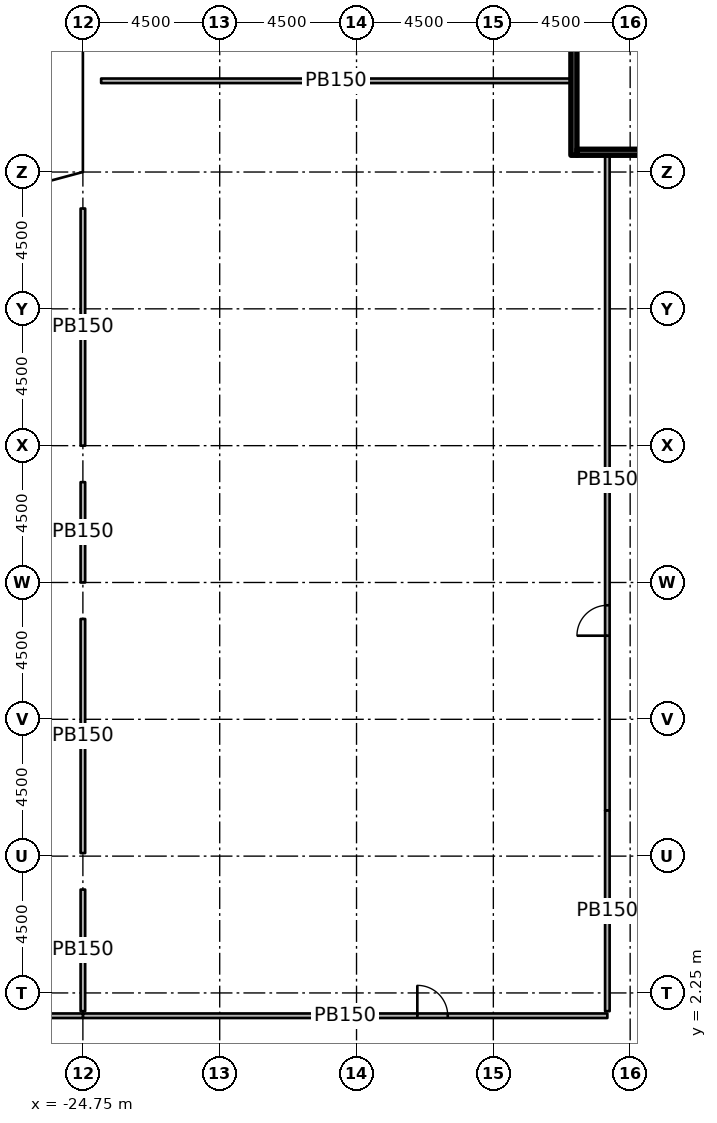
"""IFC4 building model, lengths in metres.
Left out: names, types, materials, properties, quantities, classifications, styles, units other than length and angle.
Written with IfcOpenShell. Run it as: python <this file> out.ifc"""

import sys

from ifc_helpers import new_model, si_unit, direction, frame, frame_2d, origin, origin_2d, place, context, subcontext, project, spatial, rectangle, extrude, element, fill, save


model = new_model("IFC4")
c1 = context("Model", 3, precision=1e-05, world=origin(), true_north=direction((0.0, 1.0)))
c2 = subcontext(c1, "Body", "Model", "MODEL_VIEW")
j1 = project(units=[si_unit("LENGTHUNIT", "METRE"), si_unit("PLANEANGLEUNIT", "RADIAN")], contexts=[c1])
p1 = place(None, origin())
s1 = spatial("IfcSite", under=j1, at=p1, CompositionType="ELEMENT")
p2 = place(p1, origin())
s2 = spatial("IfcBuilding", under=s1, at=p2, CompositionType="ELEMENT")
p3 = place(p2, frame((0.0, 0.0, 7.0)))
s3 = spatial("IfcBuildingStorey", under=s2, at=p3, CompositionType="ELEMENT", Elevation=7.0)
for number, where, z_axis, x_axis in (
    (1, (-24.75, 6.25, 0.0), (0.0, 0.0, 1.0), (1.0, 0.0, 0.0)),
    (2, (-24.75, 15.15, 0.0), (0.0, 0.0, 1.0), (1.0, 0.0, 0.0)),
    (3, (-24.15, 19.65, 0.0), (0.0, 0.0, 1.0), (1.0, 0.0, 0.0)),
    (4, (-24.15, 28.65, 0.0), (0.0, 0.0, 1.0), (1.0, 0.0, 0.0)),
    (5, (-20.25, 6.11, 0.0), (0.0, 0.0, 1.0), (1.0, 0.0, 0.0)),
    (6, (-20.25, 10.65, 0.0), (0.0, 0.0, 1.0), (1.0, 0.0, 0.0)),
    (7, (-19.65, 15.15, 0.0), (0.0, 0.0, 1.0), (1.0, 0.0, 0.0)),
    (8, (-19.65, 24.15, 0.0), (0.0, 0.0, 1.0), (1.0, 0.0, 0.0)),
    (9, (-15.75, 6.25, 0.0), (0.0, 0.0, 1.0), (1.0, 0.0, 0.0)),
    (10, (-15.15, 10.65, 0.0), (0.0, 0.0, 1.0), (1.0, 0.0, 0.0)),
    (11, (-15.15, 19.65, 0.0), (0.0, 0.0, 1.0), (1.0, 0.0, 0.0)),
    (12, (-15.15, 33.75, 0.0), (0.0, 0.0, 1.0), (1.0, 0.0, 0.0)),
    (13, (-10.75, 6.25, 0.0), (0.0, 0.0, 1.0), (1.0, 0.0, 0.0)),
    (14, (-10.65, 15.15, 0.0), (0.0, 0.0, 1.0), (1.0, 0.0, 0.0)),
    (15, (-10.65, 29.25, 0.0), (0.0, 0.0, 1.0), (1.0, 0.0, 0.0)),
    (16, (-6.25, 6.25, 0.0), (0.0, 0.0, 1.0), (1.0, 0.0, 0.0)),
    (17, (-6.25, 10.75, 0.0), (0.0, 0.0, 1.0), (1.0, 0.0, 0.0)),
    (18, (-6.25, 15.75, 0.0), (0.0, 0.0, 1.0), (1.0, 0.0, 0.0)),
    (19, (-6.25, 20.25, 0.0), (0.0, 0.0, 1.0), (1.0, 0.0, 0.0)),
    (20, (-6.25, 24.65, 0.0), (0.0, 0.0, 1.0), (1.0, 0.0, 0.0)),
    (21, (-6.25, 26.7, 0.0), (0.0, 0.0, 1.0), (1.0, 0.0, 0.0)),
):
    element("IfcColumn", number, at=place(p3, frame(where, z_axis=z_axis, x_axis=x_axis)), inside=s3, PredefinedType="COLUMN", context=c2, shape_type="SweptSolid", body=[
        extrude(rectangle(XDim=1.2, YDim=1.2, at=origin_2d()), origin(), (0.0, 0.0, 1.0), 4.55),
    ])
p4 = place(p3, frame((-8.6, 29.8, 0.0), z_axis=(0.0, 0.0, 1.0), x_axis=(0.0, 1.0, 0.0)))
e22 = element("IfcWall", 22, at=p4, inside=s3, PredefinedType="SHEAR", context=c2, shape_type="SweptSolid", body=[
    extrude(rectangle(XDim=8.0, YDim=0.2, at=frame_2d((4.0, 0.0))), origin(), (0.0, 0.0, 1.0), 4.55),
])
p5 = place(p3, frame((-8.5, 29.9, 0.0), z_axis=(0.0, 0.0, 1.0), x_axis=(1.0, 0.0, 0.0)))
e23 = element("IfcWall", 23, at=p5, inside=s3, PredefinedType="SHEAR", context=c2, shape_type="SweptSolid", body=[
    extrude(rectangle(XDim=4.2, YDim=0.2, at=frame_2d((2.1, 0.0))), origin(), (0.0, 0.0, 1.0), 4.55),
])
p6 = place(p3, frame((-7.5, 8.25, 0.0), z_axis=(0.0, 0.0, 1.0), x_axis=(0.0, 1.0, 0.0)))
e24 = element("IfcWall", 24, at=p6, inside=s3, PredefinedType="PARTITIONING", context=c2, shape_type="SweptSolid", body=[
    extrude(rectangle(XDim=21.75, YDim=0.15, at=frame_2d((10.875, 0.0))), origin(), (0.0, 0.0, 1.0), 4.55),
])
p7 = place(p6, frame((5.75, 0.0, 0.0)))
e25 = element("IfcOpeningElement", 25, at=p7, cuts=e24, PredefinedType="OPENING", context=c2, shape_type="SweptSolid", body=[
    extrude(rectangle(XDim=1.0, YDim=2.1, at=frame_2d((0.5, 1.05))), frame((0.0, 0.085, 0.0), z_axis=(0.0, -1.0, 0.0), x_axis=(1.0, 0.0, 0.0)), (0.0, 0.0, 1.0), 0.17),
])
p8 = place(p3, frame((-24.75, 1.5, 0.0), z_axis=(0.0, 0.0, 1.0), x_axis=(1.0, 0.0, 0.0)))
e26 = element("IfcWall", 26, at=p8, inside=s3, PredefinedType="PARTITIONING", context=c2, shape_type="SweptSolid", body=[
    extrude(rectangle(XDim=17.25, YDim=0.15, at=frame_2d((8.625, 0.0))), origin(), (0.0, 0.0, 1.0), 4.55),
])
p9 = place(p8, frame((11.0, 0.0, 0.0)))
e27 = element("IfcOpeningElement", 27, at=p9, cuts=e26, PredefinedType="OPENING", context=c2, shape_type="SweptSolid", body=[
    extrude(rectangle(XDim=1.0, YDim=2.1, at=frame_2d((0.5, 1.05))), frame((0.0, 0.085, 0.0), z_axis=(0.0, -1.0, 0.0), x_axis=(1.0, 0.0, 0.0)), (0.0, 0.0, 1.0), 0.17),
])
p10 = place(p3, frame((-51.15, 1.5, 0.0), z_axis=(0.0, 0.0, 1.0), x_axis=(1.0, 0.0, 0.0)))
e28 = element("IfcWall", 28, at=p10, inside=s3, PredefinedType="PARTITIONING", context=c2, shape_type="SweptSolid", body=[
    extrude(rectangle(XDim=26.4, YDim=0.15, at=frame_2d((13.2, 0.0))), origin(), (0.0, 0.0, 1.0), 4.55),
])
p11 = place(p10, frame((11.9, 0.0, 0.0)))
e29 = element("IfcOpeningElement", 29, at=p11, cuts=e28, PredefinedType="OPENING", context=c2, shape_type="SweptSolid", body=[
    extrude(rectangle(XDim=0.9, YDim=2.1, at=frame_2d((0.45, 1.05))), frame((0.0, 0.085, 0.0), z_axis=(0.0, -1.0, 0.0), x_axis=(1.0, 0.0, 0.0)), (0.0, 0.0, 1.0), 0.17),
])
p12 = place(p3, frame((-24.75, 1.65, 0.0), z_axis=(0.0, 0.0, 1.0), x_axis=(0.0, 1.0, 0.0)))
e30 = element("IfcWall", 30, at=p12, inside=s3, PredefinedType="PARTITIONING", context=c2, shape_type="SweptSolid", body=[
    extrude(rectangle(XDim=4.0, YDim=0.15, at=frame_2d((2.0, 0.0))), origin(), (0.0, 0.0, 1.0), 4.55),
])
p13 = place(p3, frame((-24.75, 6.85, 0.0), z_axis=(0.0, 0.0, 1.0), x_axis=(0.0, 1.0, 0.0)))
e31 = element("IfcWall", 31, at=p13, inside=s3, PredefinedType="PARTITIONING", context=c2, shape_type="SweptSolid", body=[
    extrude(rectangle(XDim=7.7, YDim=0.15, at=frame_2d((3.85, 0.0))), origin(), (0.0, 0.0, 1.0), 4.55),
])
p14 = place(p3, frame((-24.75, 15.75, 0.0), z_axis=(0.0, 0.0, 1.0), x_axis=(0.0, 1.0, 0.0)))
e32 = element("IfcWall", 32, at=p14, inside=s3, PredefinedType="PARTITIONING", context=c2, shape_type="SweptSolid", body=[
    extrude(rectangle(XDim=3.3, YDim=0.15, at=frame_2d((1.65, 0.0))), origin(), (0.0, 0.0, 1.0), 4.55),
])
p15 = place(p3, frame((-24.75, 20.25, 0.0), z_axis=(0.0, 0.0, 1.0), x_axis=(0.0, 1.0, 0.0)))
e33 = element("IfcWall", 33, at=p15, inside=s3, PredefinedType="PARTITIONING", context=c2, shape_type="SweptSolid", body=[
    extrude(rectangle(XDim=7.8, YDim=0.15, at=frame_2d((3.9, 0.0))), origin(), (0.0, 0.0, 1.0), 4.55),
])
p16 = place(p3, frame((-24.15, 32.25, 0.0), z_axis=(0.0, 0.0, 1.0), x_axis=(1.0, 0.0, 0.0)))
e34 = element("IfcWall", 34, at=p16, inside=s3, PredefinedType="PARTITIONING", context=c2, shape_type="SweptSolid", body=[
    extrude(rectangle(XDim=15.45, YDim=0.15, at=frame_2d((7.725, 0.0))), origin(), (0.0, 0.0, 1.0), 4.55),
])
p17 = place(p3, frame((-7.5, 8.25, 0.0), z_axis=(0.0, 0.0, 1.0), x_axis=(0.0, -1.0, 0.0)))
e35 = element("IfcWall", 35, at=p17, inside=s3, PredefinedType="PARTITIONING", context=c2, shape_type="SweptSolid", body=[
    extrude(rectangle(XDim=6.6, YDim=0.15, at=frame_2d((3.3, 0.0))), origin(), (0.0, 0.0, 1.0), 4.55),
])
p18 = place(p7, origin())
e36 = element("IfcDoor", 36, at=p18, inside=s3, OperationType="SINGLE_SWING_LEFT", PredefinedType="DOOR", context=c2, shape_type="SweptSolid", body=[
    extrude(rectangle(XDim=1.0, YDim=2.1, at=frame_2d((0.5, 1.05))), frame((0.0, 0.025, 0.0), z_axis=(0.0, -1.0, 0.0), x_axis=(1.0, 0.0, 0.0)), (0.0, 0.0, 1.0), 0.05),
])
fill(e25, e36)
p19 = place(p9, origin())
e37 = element("IfcDoor", 37, at=p19, inside=s3, OperationType="SINGLE_SWING_LEFT", PredefinedType="DOOR", context=c2, shape_type="SweptSolid", body=[
    extrude(rectangle(XDim=1.0, YDim=2.1, at=frame_2d((0.5, 1.05))), frame((0.0, 0.025, 0.0), z_axis=(0.0, -1.0, 0.0), x_axis=(1.0, 0.0, 0.0)), (0.0, 0.0, 1.0), 0.05),
])
fill(e27, e37)
save(model, sys.argv[1])
